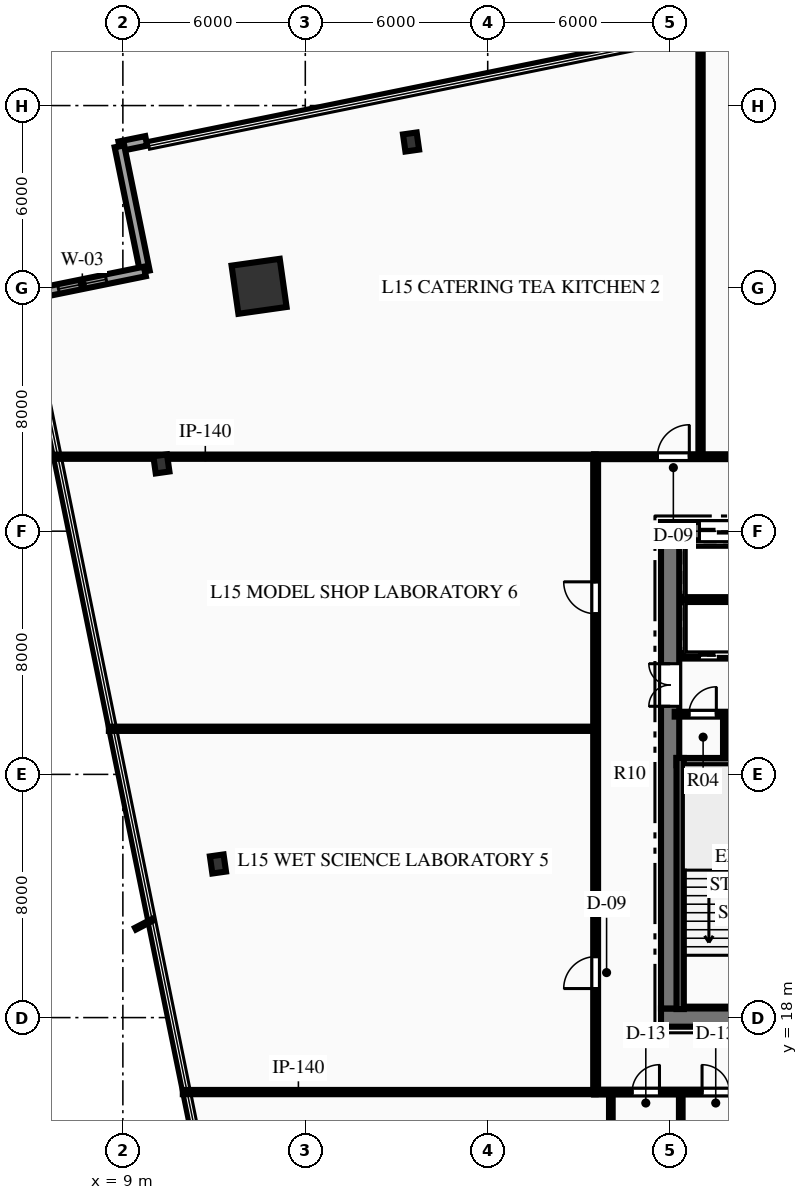
"""IFC4 building model, lengths in metres.
Left out: names, types, materials, properties, quantities, classifications, styles, units other than length and angle.
Written with IfcOpenShell. Run it as: python <this file> out.ifc"""

import sys

from ifc_helpers import new_model, si_unit, direction, frame, frame_2d, origin, origin_2d, place, context, subcontext, project, spatial, rectangle, hollow_rectangle, i_section, extrude, element, fill, save


model = new_model("IFC4")
c1 = context("Model", 3, precision=1e-05, world=origin(), true_north=direction((0.0, 1.0)))
c2 = subcontext(c1, "Body", "Model", "MODEL_VIEW")
j1 = project(units=[si_unit("LENGTHUNIT", "METRE"), si_unit("PLANEANGLEUNIT", "RADIAN")], contexts=[c1])
p1 = place(None, origin())
s1 = spatial("IfcSite", under=j1, at=p1, CompositionType="ELEMENT")
p2 = place(p1, origin())
s2 = spatial("IfcBuilding", under=s1, at=p2, CompositionType="ELEMENT")
p3 = place(p2, frame((0.0, 0.0, 66.45)))
s3 = spatial("IfcBuildingStorey", under=s2, at=p3, CompositionType="ELEMENT", Elevation=66.45)
p4 = place(p3, frame((26.7, 18.0, 0.0), z_axis=(0.0, 0.0, 1.0), x_axis=(1.0, 0.0, 0.0)))
e1 = element("IfcWall", 1, at=p4, inside=s3, PredefinedType="SHEAR", context=c2, shape_type="SweptSolid", body=[
    extrude(rectangle(XDim=18.6, YDim=0.6, at=frame_2d((9.3, 0.0))), origin(), (0.0, 0.0, 1.0), 3.75),
])
p5 = place(p4, frame((7.4, 0.0, 0.0)))
e2 = element("IfcOpeningElement", 2, at=p5, cuts=e1, PredefinedType="OPENING", context=c2, shape_type="SweptSolid", body=[
    extrude(rectangle(XDim=1.1, YDim=2.15, at=frame_2d((0.55, 1.075))), frame((0.0, 0.31, 0.0), z_axis=(0.0, -1.0, 0.0), x_axis=(1.0, 0.0, 0.0)), (0.0, 0.0, 1.0), 0.62),
])
p6 = place(p4, frame((10.1, 0.0, 0.0)))
e3 = element("IfcOpeningElement", 3, at=p6, cuts=e1, PredefinedType="OPENING", context=c2, shape_type="SweptSolid", body=[
    extrude(rectangle(XDim=1.1, YDim=2.15, at=frame_2d((0.55, 1.075))), frame((0.0, 0.31, 0.0), z_axis=(0.0, -1.0, 0.0), x_axis=(1.0, 0.0, 0.0)), (0.0, 0.0, 1.0), 0.62),
])
p7 = place(p3, frame((26.7, 34.0, 0.0), z_axis=(0.0, 0.0, 1.0), x_axis=(1.0, 0.0, 0.0)))
e4 = element("IfcWall", 4, at=p7, inside=s3, PredefinedType="SHEAR", context=c2, shape_type="SweptSolid", body=[
    extrude(rectangle(XDim=18.6, YDim=0.6, at=frame_2d((9.3, 0.0))), origin(), (0.0, 0.0, 1.0), 3.75),
])
p8 = place(p7, frame((1.265, 0.0, 0.0)))
e5 = element("IfcOpeningElement", 5, at=p8, cuts=e4, PredefinedType="OPENING", context=c2, shape_type="SweptSolid", body=[
    extrude(rectangle(XDim=1.1, YDim=2.15, at=frame_2d((0.55, 1.075))), frame((0.0, 0.31, 0.0), z_axis=(0.0, -1.0, 0.0), x_axis=(1.0, 0.0, 0.0)), (0.0, 0.0, 1.0), 0.62),
])
p9 = place(p7, frame((3.515, 0.0, 0.0)))
e6 = element("IfcOpeningElement", 6, at=p9, cuts=e4, PredefinedType="OPENING", context=c2, shape_type="SweptSolid", body=[
    extrude(rectangle(XDim=1.1, YDim=2.15, at=frame_2d((0.55, 1.075))), frame((0.0, 0.31, 0.0), z_axis=(0.0, -1.0, 0.0), x_axis=(1.0, 0.0, 0.0)), (0.0, 0.0, 1.0), 0.62),
])
p10 = place(p7, frame((13.985, 0.0, 0.0)))
e7 = element("IfcOpeningElement", 7, at=p10, cuts=e4, PredefinedType="OPENING", context=c2, shape_type="SweptSolid", body=[
    extrude(rectangle(XDim=1.1, YDim=2.15, at=frame_2d((0.55, 1.075))), frame((0.0, 0.31, 0.0), z_axis=(0.0, -1.0, 0.0), x_axis=(1.0, 0.0, 0.0)), (0.0, 0.0, 1.0), 0.62),
])
p11 = place(p7, frame((16.235, 0.0, 0.0)))
e8 = element("IfcOpeningElement", 8, at=p11, cuts=e4, PredefinedType="OPENING", context=c2, shape_type="SweptSolid", body=[
    extrude(rectangle(XDim=1.1, YDim=2.15, at=frame_2d((0.55, 1.075))), frame((0.0, 0.31, 0.0), z_axis=(0.0, -1.0, 0.0), x_axis=(1.0, 0.0, 0.0)), (0.0, 0.0, 1.0), 0.62),
])
p12 = place(p3, frame((27.0, 18.3, 0.0), z_axis=(0.0, 0.0, 1.0), x_axis=(0.0, 1.0, 0.0)))
e9 = element("IfcWall", 9, at=p12, inside=s3, PredefinedType="SHEAR", context=c2, shape_type="SweptSolid", body=[
    extrude(rectangle(XDim=15.4, YDim=0.6, at=frame_2d((7.7, 0.0))), origin(), (0.0, 0.0, 1.0), 3.75),
])
p13 = place(p12, frame((9.94, 0.0, 0.0)))
e10 = element("IfcOpeningElement", 10, at=p13, cuts=e9, PredefinedType="OPENING", context=c2, shape_type="SweptSolid", body=[
    extrude(rectangle(XDim=1.4, YDim=2.2, at=frame_2d((0.7, 1.1))), frame((0.0, 0.31, 0.0), z_axis=(0.0, -1.0, 0.0), x_axis=(1.0, 0.0, 0.0)), (0.0, 0.0, 1.0), 0.62),
])
p14 = place(p3, frame((27.21, 26.42, 0.0), z_axis=(0.0, 0.0, 1.0), x_axis=(1.0, 0.0, 0.0)))
e11 = element("IfcWall", 11, at=p14, inside=s3, PredefinedType="SHEAR", context=c2, shape_type="SweptSolid", body=[
    extrude(rectangle(XDim=3.98, YDim=0.24, at=frame_2d((1.99, 0.0))), origin(), (0.0, 0.0, 1.0), 3.75),
])
p15 = place(p3, frame((27.33, 18.28, 0.0), z_axis=(0.0, 0.0, 1.0), x_axis=(0.0, 1.0, 0.0)))
e12 = element("IfcWall", 12, at=p15, inside=s3, PredefinedType="SHEAR", context=c2, shape_type="SweptSolid", body=[
    extrude(rectangle(XDim=8.26, YDim=0.24, at=frame_2d((4.13, 0.0))), origin(), (0.0, 0.0, 1.0), 3.75),
])
p16 = place(p3, frame((13.48, 42.054, 0.0), z_axis=(0.0, 0.0, 1.0), x_axis=(0.990146240249, 0.140037219771, 0.0)))
e13 = element("IfcColumn", 13, at=p16, inside=s3, PredefinedType="COLUMN", context=c2, shape_type="SweptSolid", body=[
    extrude(hollow_rectangle(XDim=1.6, YDim=1.6, WallThickness=0.08, at=origin_2d()), origin(), (0.0, 0.0, 1.0), 3.75),
])
for number, where, z_axis, x_axis in (
    (14, (18.479, 46.801, 0.0), (0.0, 0.0, 1.0), (0.99, 0.14, 0.0)),
    (15, (10.266, 36.213, 0.0), (0.0, 0.0, 1.0), (0.99, 0.14, 0.0)),
    (16, (12.127, 23.053, 0.0), (0.0, 0.0, 1.0), (0.99, 0.14, 0.0)),
):
    element("IfcColumn", number, at=place(p3, frame(where, z_axis=z_axis, x_axis=x_axis)), inside=s3, PredefinedType="COLUMN", context=c2, shape_type="SweptSolid", body=[
        extrude(i_section(OverallWidth=0.454, OverallDepth=0.569, WebThickness=0.078, FlangeThickness=0.125, at=origin_2d()), origin(), (0.0, 0.0, 1.0), 3.75),
    ])
p17 = place(p3, frame((8.887, 46.659, 0.0), z_axis=(0.0, 0.0, 1.0), x_axis=(0.979917798202, 0.199401877541, 0.0)))
e17 = element("IfcWall", 17, at=p17, inside=s3, PredefinedType="STANDARD", context=c2, shape_type="SweptSolid", body=[
    extrude(rectangle(XDim=0.9, YDim=0.32, at=frame_2d((0.45, 0.0))), origin(), (0.0, 0.0, 1.0), 3.44),
])
p18 = place(p3, frame((9.724, 42.544, 0.0), z_axis=(0.0, 0.0, 1.0), x_axis=(-0.199334697597, 0.979931466141, 0.0)))
e18 = element("IfcWall", 18, at=p18, inside=s3, PredefinedType="STANDARD", context=c2, shape_type="SweptSolid", body=[
    extrude(rectangle(XDim=4.2, YDim=0.32, at=frame_2d((2.1, 0.0))), origin(), (0.0, 0.0, 1.0), 3.44),
])
p19 = place(p3, frame((5.609, 41.706, 0.0), z_axis=(0.0, 0.0, 1.0), x_axis=(0.979920109503, 0.199390518811, 0.0)))
e19 = element("IfcWall", 19, at=p19, inside=s3, PredefinedType="STANDARD", context=c2, shape_type="SweptSolid", body=[
    extrude(rectangle(XDim=4.2, YDim=0.32, at=frame_2d((2.1, 0.0))), origin(), (0.0, 0.0, 1.0), 3.44),
])
p20 = place(p19, frame((1.3, 0.0, 0.85)))
e20 = element("IfcOpeningElement", 20, at=p20, cuts=e19, PredefinedType="OPENING", context=c2, shape_type="SweptSolid", body=[
    extrude(rectangle(XDim=1.6, YDim=2.1, at=frame_2d((0.8, 1.05))), frame((0.0, 0.17, 0.0), z_axis=(0.0, -1.0, 0.0), x_axis=(1.0, 0.0, 0.0)), (0.0, 0.0, 1.0), 0.34),
])
p21 = place(p3, frame((27.15, 27.98, 0.0), z_axis=(0.0, 0.0, 1.0), x_axis=(1.0, 0.0, 0.0)))
e21 = element("IfcWall", 21, at=p21, inside=s3, PredefinedType="PARTITIONING", context=c2, shape_type="SweptSolid", body=[
    extrude(rectangle(XDim=4.05, YDim=0.16, at=frame_2d((2.025, 0.0))), origin(), (0.0, 0.0, 1.0), 3.44),
])
p22 = place(p21, frame((0.47, 0.0, 0.0)))
e22 = element("IfcOpeningElement", 22, at=p22, cuts=e21, PredefinedType="OPENING", context=c2, shape_type="SweptSolid", body=[
    extrude(rectangle(XDim=0.9, YDim=2.15, at=frame_2d((0.45, 1.075))), frame((0.0, 0.09, 0.0), z_axis=(0.0, -1.0, 0.0), x_axis=(1.0, 0.0, 0.0)), (0.0, 0.0, 1.0), 0.18),
])
p23 = place(p21, frame((2.36, 0.0, 0.0)))
e23 = element("IfcOpeningElement", 23, at=p23, cuts=e21, PredefinedType="OPENING", context=c2, shape_type="SweptSolid", body=[
    extrude(rectangle(XDim=0.9, YDim=2.15, at=frame_2d((0.45, 1.075))), frame((0.0, 0.09, 0.0), z_axis=(0.0, -1.0, 0.0), x_axis=(1.0, 0.0, 0.0)), (0.0, 0.0, 1.0), 0.18),
])
p24 = place(p3, frame((28.8, 26.54, 0.0), z_axis=(0.0, 0.0, 1.0), x_axis=(0.0, 1.0, 0.0)))
e24 = element("IfcWall", 24, at=p24, inside=s3, PredefinedType="PARTITIONING", context=c2, shape_type="SweptSolid", body=[
    extrude(rectangle(XDim=1.44, YDim=0.12, at=frame_2d((0.72, 0.0))), origin(), (0.0, 0.0, 1.0), 3.44),
])
p25 = place(p3, frame((27.45, 29.9, 0.0), z_axis=(0.0, 0.0, 1.0), x_axis=(1.0, 0.0, 0.0)))
e25 = element("IfcWall", 25, at=p25, inside=s3, PredefinedType="PARTITIONING", context=c2, shape_type="SweptSolid", body=[
    extrude(rectangle(XDim=4.43, YDim=0.18, at=frame_2d((2.215, 0.0))), origin(), (0.0, 0.0, 1.0), 3.44),
])
p26 = place(p25, frame((0.515, 0.0, 0.0)))
e26 = element("IfcOpeningElement", 26, at=p26, cuts=e25, PredefinedType="OPENING", context=c2, shape_type="SweptSolid", body=[
    extrude(rectangle(XDim=1.1, YDim=2.15, at=frame_2d((0.55, 1.075))), frame((0.0, 0.1, 0.0), z_axis=(0.0, -1.0, 0.0), x_axis=(1.0, 0.0, 0.0)), (0.0, 0.0, 1.0), 0.2),
])
p27 = place(p25, frame((2.765, 0.0, 0.0)))
e27 = element("IfcOpeningElement", 27, at=p27, cuts=e25, PredefinedType="OPENING", context=c2, shape_type="SweptSolid", body=[
    extrude(rectangle(XDim=1.1, YDim=2.15, at=frame_2d((0.55, 1.075))), frame((0.0, 0.1, 0.0), z_axis=(0.0, -1.0, 0.0), x_axis=(1.0, 0.0, 0.0)), (0.0, 0.0, 1.0), 0.2),
])
p28 = place(p3, frame((27.45, 31.75, 0.0), z_axis=(0.0, 0.0, 1.0), x_axis=(1.0, 0.0, 0.0)))
e28 = element("IfcWall", 28, at=p28, inside=s3, PredefinedType="PARTITIONING", context=c2, shape_type="SweptSolid", body=[
    extrude(rectangle(XDim=4.43, YDim=0.18, at=frame_2d((2.215, 0.0))), origin(), (0.0, 0.0, 1.0), 3.44),
])
p29 = place(p3, frame((24.5, 15.55, 0.0), z_axis=(0.0, 0.0, 1.0), x_axis=(1.0, 0.0, 0.0)))
e29 = element("IfcWall", 29, at=p29, inside=s3, PredefinedType="PARTITIONING", context=c2, shape_type="SweptSolid", body=[
    extrude(rectangle(XDim=23.0, YDim=0.16, at=frame_2d((11.5, 0.0))), origin(), (0.0, 0.0, 1.0), 3.44),
])
p30 = place(p29, frame((1.25, 0.0, 0.0)))
e30 = element("IfcOpeningElement", 30, at=p30, cuts=e29, PredefinedType="OPENING", context=c2, shape_type="SweptSolid", body=[
    extrude(rectangle(XDim=0.9, YDim=2.15, at=frame_2d((0.45, 1.075))), frame((0.0, 0.09, 0.0), z_axis=(0.0, -1.0, 0.0), x_axis=(1.0, 0.0, 0.0)), (0.0, 0.0, 1.0), 0.18),
])
p31 = place(p29, frame((3.55, 0.0, 0.0)))
e31 = element("IfcOpeningElement", 31, at=p31, cuts=e29, PredefinedType="OPENING", context=c2, shape_type="SweptSolid", body=[
    extrude(rectangle(XDim=0.9, YDim=2.15, at=frame_2d((0.45, 1.075))), frame((0.0, 0.09, 0.0), z_axis=(0.0, -1.0, 0.0), x_axis=(1.0, 0.0, 0.0)), (0.0, 0.0, 1.0), 0.18),
])
p32 = place(p29, frame((5.8, 0.0, 0.0)))
e32 = element("IfcOpeningElement", 32, at=p32, cuts=e29, PredefinedType="OPENING", context=c2, shape_type="SweptSolid", body=[
    extrude(rectangle(XDim=1.0, YDim=2.15, at=frame_2d((0.5, 1.075))), frame((0.0, 0.09, 0.0), z_axis=(0.0, -1.0, 0.0), x_axis=(1.0, 0.0, 0.0)), (0.0, 0.0, 1.0), 0.18),
])
p33 = place(p29, frame((17.399, 0.0, 0.0)))
e33 = element("IfcOpeningElement", 33, at=p33, cuts=e29, PredefinedType="OPENING", context=c2, shape_type="SweptSolid", body=[
    extrude(rectangle(XDim=1.05, YDim=2.15, at=frame_2d((0.525, 1.075))), frame((0.0, 0.09, 0.0), z_axis=(0.0, -1.0, 0.0), x_axis=(1.0, 0.0, 0.0)), (0.0, 0.0, 1.0), 0.18),
])
p34 = place(p3, frame((24.5, 36.45, 0.0), z_axis=(0.0, 0.0, 1.0), x_axis=(1.0, 0.0, 0.0)))
e34 = element("IfcWall", 34, at=p34, inside=s3, PredefinedType="PARTITIONING", context=c2, shape_type="SweptSolid", body=[
    extrude(rectangle(XDim=23.0, YDim=0.16, at=frame_2d((11.5, 0.0))), origin(), (0.0, 0.0, 1.0), 3.44),
])
p35 = place(p34, frame((2.081, 0.0, 0.0)))
e35 = element("IfcOpeningElement", 35, at=p35, cuts=e34, PredefinedType="OPENING", context=c2, shape_type="SweptSolid", body=[
    extrude(rectangle(XDim=1.05, YDim=2.15, at=frame_2d((0.525, 1.075))), frame((0.0, 0.09, 0.0), z_axis=(0.0, -1.0, 0.0), x_axis=(1.0, 0.0, 0.0)), (0.0, 0.0, 1.0), 0.18),
])
p36 = place(p34, frame((12.955, 0.0, 0.0)))
e36 = element("IfcOpeningElement", 36, at=p36, cuts=e34, PredefinedType="OPENING", context=c2, shape_type="SweptSolid", body=[
    extrude(rectangle(XDim=1.05, YDim=2.15, at=frame_2d((0.525, 1.075))), frame((0.0, 0.09, 0.0), z_axis=(0.0, -1.0, 0.0), x_axis=(1.0, 0.0, 0.0)), (0.0, 0.0, 1.0), 0.18),
])
p37 = place(p34, frame((18.849, 0.0, 0.0)))
e37 = element("IfcOpeningElement", 37, at=p37, cuts=e34, PredefinedType="OPENING", context=c2, shape_type="SweptSolid", body=[
    extrude(rectangle(XDim=1.05, YDim=2.15, at=frame_2d((0.525, 1.075))), frame((0.0, 0.09, 0.0), z_axis=(0.0, -1.0, 0.0), x_axis=(1.0, 0.0, 0.0)), (0.0, 0.0, 1.0), 0.18),
])
p38 = place(p3, frame((24.55, 15.55, 0.0), z_axis=(0.0, 0.0, 1.0), x_axis=(0.0, 1.0, 0.0)))
e38 = element("IfcWall", 38, at=p38, inside=s3, PredefinedType="PARTITIONING", context=c2, shape_type="SweptSolid", body=[
    extrude(rectangle(XDim=20.9, YDim=0.16, at=frame_2d((10.45, 0.0))), origin(), (0.0, 0.0, 1.0), 3.44),
])
p39 = place(p38, frame((3.405, 0.0, 0.0)))
e39 = element("IfcOpeningElement", 39, at=p39, cuts=e38, PredefinedType="OPENING", context=c2, shape_type="SweptSolid", body=[
    extrude(rectangle(XDim=1.05, YDim=2.15, at=frame_2d((0.525, 1.075))), frame((0.0, 0.09, 0.0), z_axis=(0.0, -1.0, 0.0), x_axis=(1.0, 0.0, 0.0)), (0.0, 0.0, 1.0), 0.18),
])
p40 = place(p38, frame((15.734, 0.0, 0.0)))
e40 = element("IfcOpeningElement", 40, at=p40, cuts=e38, PredefinedType="OPENING", context=c2, shape_type="SweptSolid", body=[
    extrude(rectangle(XDim=1.05, YDim=2.15, at=frame_2d((0.525, 1.075))), frame((0.0, 0.09, 0.0), z_axis=(0.0, -1.0, 0.0), x_axis=(1.0, 0.0, 0.0)), (0.0, 0.0, 1.0), 0.18),
])
for number, where, z_axis, x_axis in (
    (41, (25.05, 11.65, 0.0), (0.0, 0.0, 1.0), (0.0, 1.0, 0.0)),
    (42, (27.35, 11.65, 0.0), (0.0, 0.0, 1.0), (0.0, 1.0, 0.0)),
):
    element("IfcWall", number, at=place(p3, frame(where, z_axis=z_axis, x_axis=x_axis)), inside=s3, PredefinedType="PARTITIONING", context=c2, shape_type="SweptSolid", body=[
        extrude(rectangle(XDim=3.9, YDim=0.12, at=frame_2d((1.95, 0.0))), origin(), (0.0, 0.0, 1.0), 3.44),
    ])
p41 = place(p3, frame((10.971, 15.55, 0.0), z_axis=(0.0, 0.0, 1.0), x_axis=(1.0, 0.0, 0.0)))
e43 = element("IfcWall", 43, at=p41, inside=s3, PredefinedType="PARTITIONING", context=c2, shape_type="SweptSolid", body=[
    extrude(rectangle(XDim=13.579, YDim=0.14, at=frame_2d((6.79, 0.0))), origin(), (0.0, 0.0, 1.0), 3.44),
])
p42 = place(p3, frame((6.719, 36.45, 0.0), z_axis=(0.0, 0.0, 1.0), x_axis=(1.0, 0.0, 0.0)))
e44 = element("IfcWall", 44, at=p42, inside=s3, PredefinedType="PARTITIONING", context=c2, shape_type="SweptSolid", body=[
    extrude(rectangle(XDim=17.831, YDim=0.14, at=frame_2d((8.916, 0.0))), origin(), (0.0, 0.0, 1.0), 2.972),
])
p43 = place(p3, frame((28.0, 36.45, 0.0), z_axis=(0.0, 0.0, 1.0), x_axis=(0.0, 1.0, 0.0)))
e45 = element("IfcWall", 45, at=p43, inside=s3, PredefinedType="PARTITIONING", context=c2, shape_type="SweptSolid", body=[
    extrude(rectangle(XDim=14.057, YDim=0.14, at=frame_2d((7.029, 0.0))), origin(), (0.0, 0.0, 1.0), 3.44),
])
p44 = place(p3, frame((8.54, 27.5, 0.0), z_axis=(0.0, 0.0, 1.0), x_axis=(1.0, 0.0, 0.0)))
e46 = element("IfcWall", 46, at=p44, inside=s3, PredefinedType="PARTITIONING", context=c2, shape_type="SweptSolid", body=[
    extrude(rectangle(XDim=16.01, YDim=0.14, at=frame_2d((8.005, 0.0))), origin(), (0.0, 0.0, 1.0), 3.44),
])
p45 = place(p20, origin())
e47 = element("IfcWindow", 47, at=p45, inside=s3, PartitioningType="SINGLE_PANEL", PredefinedType="WINDOW", context=c2, shape_type="SweptSolid", body=[
    extrude(rectangle(XDim=1.6, YDim=2.1, at=frame_2d((0.8, 1.05))), frame((0.0, 0.03, 0.0), z_axis=(0.0, -1.0, 0.0), x_axis=(1.0, 0.0, 0.0)), (0.0, 0.0, 1.0), 0.06),
])
fill(e20, e47)
p46 = place(p22, origin())
e48 = element("IfcDoor", 48, at=p46, inside=s3, OperationType="SINGLE_SWING_RIGHT", PredefinedType="DOOR", context=c2, shape_type="SweptSolid", body=[
    extrude(rectangle(XDim=0.9, YDim=2.15, at=frame_2d((0.45, 1.075))), frame((0.0, 0.025, 0.0), z_axis=(0.0, -1.0, 0.0), x_axis=(1.0, 0.0, 0.0)), (0.0, 0.0, 1.0), 0.05),
])
fill(e22, e48)
p47 = place(p13, origin())
e49 = element("IfcDoor", 49, at=p47, inside=s3, OperationType="DOUBLE_DOOR_SINGLE_SWING", PredefinedType="DOOR", context=c2, shape_type="SweptSolid", body=[
    extrude(rectangle(XDim=1.4, YDim=2.2, at=frame_2d((0.7, 1.1))), frame((0.0, 0.025, 0.0), z_axis=(0.0, -1.0, 0.0), x_axis=(1.0, 0.0, 0.0)), (0.0, 0.0, 1.0), 0.05),
])
fill(e10, e49)
p48 = place(p30, origin())
e50 = element("IfcDoor", 50, at=p48, inside=s3, OperationType="SINGLE_SWING_RIGHT", PredefinedType="DOOR", context=c2, shape_type="SweptSolid", body=[
    extrude(rectangle(XDim=0.9, YDim=2.15, at=frame_2d((0.45, 1.075))), frame((0.0, 0.025, 0.0), z_axis=(0.0, -1.0, 0.0), x_axis=(1.0, 0.0, 0.0)), (0.0, 0.0, 1.0), 0.05),
])
fill(e30, e50)
p49 = place(p31, origin())
e51 = element("IfcDoor", 51, at=p49, inside=s3, OperationType="SINGLE_SWING_LEFT", PredefinedType="DOOR", context=c2, shape_type="SweptSolid", body=[
    extrude(rectangle(XDim=0.9, YDim=2.15, at=frame_2d((0.45, 1.075))), frame((0.0, 0.025, 0.0), z_axis=(0.0, -1.0, 0.0), x_axis=(1.0, 0.0, 0.0)), (0.0, 0.0, 1.0), 0.05),
])
fill(e31, e51)
p50 = place(p35, origin())
e52 = element("IfcDoor", 52, at=p50, inside=s3, OperationType="SINGLE_SWING_RIGHT", PredefinedType="DOOR", context=c2, shape_type="SweptSolid", body=[
    extrude(rectangle(XDim=1.05, YDim=2.15, at=frame_2d((0.525, 1.075))), frame((0.0, 0.025, 0.0), z_axis=(0.0, -1.0, 0.0), x_axis=(1.0, 0.0, 0.0)), (0.0, 0.0, 1.0), 0.05),
])
fill(e35, e52)
p51 = place(p39, origin())
e53 = element("IfcDoor", 53, at=p51, inside=s3, OperationType="SINGLE_SWING_LEFT", PredefinedType="DOOR", context=c2, shape_type="SweptSolid", body=[
    extrude(rectangle(XDim=1.05, YDim=2.15, at=frame_2d((0.525, 1.075))), frame((0.0, 0.025, 0.0), z_axis=(0.0, -1.0, 0.0), x_axis=(1.0, 0.0, 0.0)), (0.0, 0.0, 1.0), 0.05),
])
fill(e39, e53)
p52 = place(p40, origin())
e54 = element("IfcDoor", 54, at=p52, inside=s3, OperationType="SINGLE_SWING_RIGHT", PredefinedType="DOOR", context=c2, shape_type="SweptSolid", body=[
    extrude(rectangle(XDim=1.05, YDim=2.15, at=frame_2d((0.525, 1.075))), frame((0.0, 0.025, 0.0), z_axis=(0.0, -1.0, 0.0), x_axis=(1.0, 0.0, 0.0)), (0.0, 0.0, 1.0), 0.05),
])
fill(e40, e54)
p53 = place(p26, origin())
e55 = element("IfcDoor", 55, at=p53, inside=s3, OperationType="SLIDING_TO_LEFT", PredefinedType="DOOR", context=c2, shape_type="SweptSolid", body=[
    extrude(rectangle(XDim=1.1, YDim=2.15, at=frame_2d((0.55, 1.075))), frame((0.0, 0.025, 0.0), z_axis=(0.0, -1.0, 0.0), x_axis=(1.0, 0.0, 0.0)), (0.0, 0.0, 1.0), 0.05),
])
fill(e26, e55)
p54 = place(p8, origin())
e56 = element("IfcDoor", 56, at=p54, inside=s3, OperationType="SLIDING_TO_LEFT", PredefinedType="DOOR", context=c2, shape_type="SweptSolid", body=[
    extrude(rectangle(XDim=1.1, YDim=2.15, at=frame_2d((0.55, 1.075))), frame((0.0, 0.025, 0.0), z_axis=(0.0, -1.0, 0.0), x_axis=(1.0, 0.0, 0.0)), (0.0, 0.0, 1.0), 0.05),
])
fill(e5, e56)
save(model, sys.argv[1])
